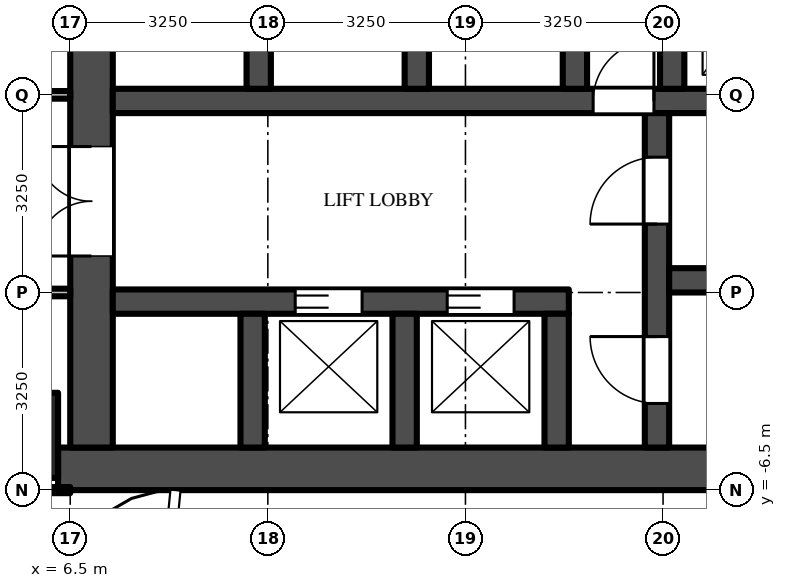
"""IFC4 building model, lengths in metres.
Left out: names, types, materials, properties, quantities, classifications, styles, units other than length and angle.
Written with IfcOpenShell. Run it as: python <this file> out.ifc"""

import sys

from ifc_helpers import new_model, si_unit, direction, frame, frame_2d, origin, origin_2d, place, context, subcontext, project, spatial, rectangle, extrude, source, transform, mapped, element, fill, save


model = new_model("IFC4")
c1 = context("Model", 3, precision=1e-05, world=origin(), true_north=direction((0.0, 1.0)))
c2 = subcontext(c1, "Body", "Model", "MODEL_VIEW")
j1 = project(units=[si_unit("LENGTHUNIT", "METRE"), si_unit("PLANEANGLEUNIT", "RADIAN")], contexts=[c1])
p1 = place(None, origin())
s1 = spatial("IfcSite", under=j1, at=p1, CompositionType="ELEMENT")
p2 = place(p1, origin())
s2 = spatial("IfcBuilding", under=s1, at=p2, CompositionType="ELEMENT")
p3 = place(p2, frame((0.0, 0.0, 65.5)))
s3 = spatial("IfcBuildingStorey", under=s2, at=p3, CompositionType="ELEMENT", Elevation=65.5)
m1 = source(origin(), c2, "Body", "SweptSolid", [
    extrude(rectangle(XDim=1.4, YDim=1.4, at=origin_2d()), origin(), (0.0, 0.0, 1.0), 4.5),
])
p4 = place(p3, frame((5.6, -5.6, 0.0), z_axis=(0.0, 0.0, 1.0), x_axis=(1.0, 0.0, 0.0)))
e1 = element("IfcColumn", 1, at=p4, inside=s3, PredefinedType="COLUMN", context=c2, shape_type="MappedRepresentation", body=[
    mapped(m1, transform((0.0, 0.0, 0.0))),
])
m2 = source(origin(), c2, "Body", "SweptSolid", [
    extrude(rectangle(XDim=16.45, YDim=0.7, at=frame_2d((8.225, 0.0))), origin(), (0.0, 0.0, 1.0), 4.25),
])
p5 = place(p3, frame((6.3, -6.15, 0.0), z_axis=(0.0, 0.0, 1.0), x_axis=(1.0, 0.0, 0.0)))
e2 = element("IfcWall", 2, at=p5, inside=s3, PredefinedType="SHEAR", context=c2, shape_type="MappedRepresentation", body=[
    mapped(m2, transform((0.0, 0.0, 0.0))),
])
m3 = source(origin(), c2, "Body", "SweptSolid", [
    extrude(rectangle(XDim=9.05, YDim=0.7, at=frame_2d((4.525, 0.0))), origin(), (0.0, 0.0, 1.0), 4.25),
])
p6 = place(p3, frame((6.85, -5.8, 0.0), z_axis=(0.0, 0.0, 1.0), x_axis=(0.0, 1.0, 0.0)))
e3 = element("IfcWall", 3, at=p6, inside=s3, PredefinedType="SHEAR", context=c2, shape_type="MappedRepresentation", body=[
    mapped(m3, transform((0.0, 0.0, 0.0))),
])
m4 = source(origin(), c2, "Body", "SweptSolid", [
    extrude(rectangle(XDim=1.8, YDim=2.1, at=frame_2d((0.9, 1.05))), frame((0.0, 0.36, 0.0), z_axis=(0.0, -1.0, 0.0), x_axis=(1.0, 0.0, 0.0)), (0.0, 0.0, 1.0), 0.72),
])
p7 = place(p6, frame((3.15, 0.0, 0.0)))
e4 = element("IfcOpeningElement", 4, at=p7, cuts=e3, PredefinedType="OPENING", context=c2, shape_type="MappedRepresentation", body=[
    mapped(m4, transform((0.0, 0.0, 0.0))),
])
m5 = source(origin(), c2, "Body", "SweptSolid", [
    extrude(rectangle(XDim=7.5, YDim=0.4, at=frame_2d((3.75, 0.0))), origin(), (0.0, 0.0, 1.0), 4.25),
])
p8 = place(p3, frame((7.2, -3.4, 0.0), z_axis=(0.0, 0.0, 1.0), x_axis=(1.0, 0.0, 0.0)))
e5 = element("IfcWall", 5, at=p8, inside=s3, PredefinedType="SHEAR", context=c2, shape_type="MappedRepresentation", body=[
    mapped(m5, transform((0.0, 0.0, 0.0))),
])
m6 = source(origin(), c2, "Body", "SweptSolid", [
    extrude(rectangle(XDim=1.1, YDim=2.1, at=frame_2d((0.55, 1.05))), frame((0.0, 0.21, 0.0), z_axis=(0.0, -1.0, 0.0), x_axis=(1.0, 0.0, 0.0)), (0.0, 0.0, 1.0), 0.42),
])
p9 = place(p8, frame((3.0, 0.0, 0.0)))
e6 = element("IfcOpeningElement", 6, at=p9, cuts=e5, PredefinedType="OPENING", context=c2, shape_type="MappedRepresentation", body=[
    mapped(m6, transform((0.0, 0.0, 0.0))),
])
p10 = place(p8, frame((5.5, 0.0, 0.0)))
e7 = element("IfcOpeningElement", 7, at=p10, cuts=e5, PredefinedType="OPENING", context=c2, shape_type="MappedRepresentation", body=[
    mapped(m6, transform((0.0, 0.0, 0.0))),
])
m7 = source(origin(), c2, "Body", "SweptSolid", [
    extrude(rectangle(XDim=14.85, YDim=0.4, at=frame_2d((7.425, 0.0))), origin(), (0.0, 0.0, 1.0), 4.25),
])
p11 = place(p3, frame((7.2, -0.1, 0.0), z_axis=(0.0, 0.0, 1.0), x_axis=(1.0, 0.0, 0.0)))
e8 = element("IfcWall", 8, at=p11, inside=s3, PredefinedType="SHEAR", context=c2, shape_type="MappedRepresentation", body=[
    mapped(m7, transform((0.0, 0.0, 0.0))),
])
m8 = source(origin(), c2, "Body", "SweptSolid", [
    extrude(rectangle(XDim=1.0, YDim=2.1, at=frame_2d((0.5, 1.05))), frame((0.0, 0.21, 0.0), z_axis=(0.0, -1.0, 0.0), x_axis=(1.0, 0.0, 0.0)), (0.0, 0.0, 1.0), 0.42),
])
p12 = place(p11, frame((7.9, 0.0, 0.0)))
e9 = element("IfcOpeningElement", 9, at=p12, cuts=e8, PredefinedType="OPENING", context=c2, shape_type="MappedRepresentation", body=[
    mapped(m8, transform((0.0, 0.0, 0.0))),
])
m9 = source(origin(), c2, "Body", "SweptSolid", [
    extrude(rectangle(XDim=5.5, YDim=0.4, at=frame_2d((2.75, 0.0))), origin(), (0.0, 0.0, 1.0), 4.25),
])
p13 = place(p3, frame((16.15, -5.8, 0.0), z_axis=(0.0, 0.0, 1.0), x_axis=(0.0, 1.0, 0.0)))
e10 = element("IfcWall", 10, at=p13, inside=s3, PredefinedType="SHEAR", context=c2, shape_type="MappedRepresentation", body=[
    mapped(m9, transform((0.0, 0.0, 0.0))),
])
p14 = place(p13, frame((0.725, 0.0, 0.0)))
e11 = element("IfcOpeningElement", 11, at=p14, cuts=e10, PredefinedType="OPENING", context=c2, shape_type="MappedRepresentation", body=[
    mapped(m6, transform((0.0, 0.0, 0.0))),
])
p15 = place(p13, frame((3.675, 0.0, 0.0)))
e12 = element("IfcOpeningElement", 12, at=p15, cuts=e10, PredefinedType="OPENING", context=c2, shape_type="MappedRepresentation", body=[
    mapped(m6, transform((0.0, 0.0, 0.0))),
])
m10 = source(origin(), c2, "Body", "SweptSolid", [
    extrude(rectangle(XDim=5.7, YDim=0.4, at=frame_2d((2.85, 0.0))), origin(), (0.0, 0.0, 1.0), 4.25),
])
p16 = place(p3, frame((16.35, -3.05, 0.0), z_axis=(0.0, 0.0, 1.0), x_axis=(1.0, 0.0, 0.0)))
e13 = element("IfcWall", 13, at=p16, inside=s3, PredefinedType="SHEAR", context=c2, shape_type="MappedRepresentation", body=[
    mapped(m10, transform((0.0, 0.0, 0.0))),
])
m11 = source(origin(), c2, "Body", "SweptSolid", [
    extrude(rectangle(XDim=2.2, YDim=0.4, at=frame_2d((1.1, 0.0))), origin(), (0.0, 0.0, 1.0), 4.25),
])
for number, where, z_axis, x_axis in (
    (14, (9.5, -5.8, 0.0), (0.0, 0.0, 1.0), (0.0, 1.0, 0.0)),
    (15, (12.0, -5.8, 0.0), (0.0, 0.0, 1.0), (0.0, 1.0, 0.0)),
    (16, (14.5, -5.8, 0.0), (0.0, 0.0, 1.0), (0.0, 1.0, 0.0)),
):
    element("IfcWall", number, at=place(p3, frame(where, z_axis=z_axis, x_axis=x_axis)), inside=s3, PredefinedType="SHEAR", context=c2, shape_type="MappedRepresentation", body=[
        mapped(m11, transform((0.0, 0.0, 0.0))),
    ])
m12 = source(origin(), c2, "Body", "SweptSolid", [
    extrude(rectangle(XDim=2.45, YDim=0.4, at=frame_2d((1.225, 0.0))), origin(), (0.0, 0.0, 1.0), 4.25),
])
for number, where, z_axis, x_axis in (
    (17, (9.6, 0.1, 0.0), (0.0, 0.0, 1.0), (0.0, 1.0, 0.0)),
    (18, (12.2, 0.1, 0.0), (0.0, 0.0, 1.0), (0.0, 1.0, 0.0)),
    (19, (14.8, 0.1, 0.0), (0.0, 0.0, 1.0), (0.0, 1.0, 0.0)),
    (20, (16.4, 0.1, 0.0), (0.0, 0.0, 1.0), (0.0, 1.0, 0.0)),
):
    element("IfcWall", number, at=place(p3, frame(where, z_axis=z_axis, x_axis=x_axis)), inside=s3, PredefinedType="SHEAR", context=c2, shape_type="MappedRepresentation", body=[
        mapped(m12, transform((0.0, 0.0, 0.0))),
    ])
m13 = source(origin(), c2, "Body", "SweptSolid", [
    extrude(rectangle(XDim=5.238, YDim=0.1, at=frame_2d((2.619, 0.0))), origin(), (0.0, 0.0, 1.0), 3.33),
])
p17 = place(p3, frame((1.262, -6.5, 0.0), z_axis=(0.0, 0.0, 1.0), x_axis=(1.0, 0.0, 0.0)))
e21 = element("IfcWall", 21, at=p17, inside=s3, PredefinedType="PARTITIONING", context=c2, shape_type="MappedRepresentation", body=[
    mapped(m13, transform((0.0, 0.0, 0.0))),
])
m14 = source(origin(), c2, "Body", "SweptSolid", [
    extrude(rectangle(XDim=5.363, YDim=0.125, at=frame_2d((2.681, 0.0))), origin(), (0.0, 0.0, 1.0), 3.468),
])
p18 = place(p3, frame((6.5, -3.25, 0.0), z_axis=(0.0, 0.0, 1.0), x_axis=(-1.0, 0.0, 0.0)))
e22 = element("IfcWall", 22, at=p18, inside=s3, PredefinedType="PARTITIONING", context=c2, shape_type="MappedRepresentation", body=[
    mapped(m14, transform((0.0, 0.0, 0.0))),
])
m15 = source(origin(), c2, "Body", "SweptSolid", [
    extrude(rectangle(XDim=1.1, YDim=2.1, at=frame_2d((0.55, 1.05))), frame((0.0, 0.073, 0.0), z_axis=(0.0, -1.0, 0.0), x_axis=(1.0, 0.0, 0.0)), (0.0, 0.0, 1.0), 0.145),
])
p19 = place(p18, frame((0.35, 0.0, 0.0)))
e23 = element("IfcOpeningElement", 23, at=p19, cuts=e22, PredefinedType="OPENING", context=c2, shape_type="MappedRepresentation", body=[
    mapped(m15, transform((0.0, 0.0, 0.0))),
])
p20 = place(p3, frame((6.5, 0.0, 0.0), z_axis=(0.0, 0.0, 1.0), x_axis=(-1.0, 0.0, 0.0)))
e24 = element("IfcWall", 24, at=p20, inside=s3, PredefinedType="PARTITIONING", context=c2, shape_type="MappedRepresentation", body=[
    mapped(m14, transform((0.0, 0.0, 0.0))),
])
m16 = source(origin(), c2, "Body", "SweptSolid", [
    extrude(rectangle(XDim=1.0, YDim=2.1, at=frame_2d((0.5, 1.05))), frame((0.0, 0.073, 0.0), z_axis=(0.0, -1.0, 0.0), x_axis=(1.0, 0.0, 0.0)), (0.0, 0.0, 1.0), 0.145),
])
p21 = place(p20, frame((3.95, 0.0, 0.0)))
e25 = element("IfcOpeningElement", 25, at=p21, cuts=e24, PredefinedType="OPENING", context=c2, shape_type="MappedRepresentation", body=[
    mapped(m16, transform((0.0, 0.0, 0.0))),
])
m17 = source(origin(), c2, "Body", "SweptSolid", [
    extrude(rectangle(XDim=1.1, YDim=2.1, at=frame_2d((0.55, 1.05))), frame((0.0, 0.025, 0.0), z_axis=(0.0, -1.0, 0.0), x_axis=(1.0, 0.0, 0.0)), (0.0, 0.0, 1.0), 0.05),
])
p22 = place(p9, origin())
e26 = element("IfcDoor", 26, at=p22, inside=s3, OperationType="DOUBLE_DOOR_SLIDING", PredefinedType="DOOR", context=c2, shape_type="MappedRepresentation", body=[
    mapped(m17, transform((0.0, 0.0, 0.0))),
])
fill(e6, e26)
p23 = place(p10, origin())
e27 = element("IfcDoor", 27, at=p23, inside=s3, OperationType="DOUBLE_DOOR_SLIDING", PredefinedType="DOOR", context=c2, shape_type="MappedRepresentation", body=[
    mapped(m17, transform((0.0, 0.0, 0.0))),
])
fill(e7, e27)
m18 = source(origin(), c2, "Body", "SweptSolid", [
    extrude(rectangle(XDim=1.8, YDim=2.1, at=frame_2d((0.9, 1.05))), frame((0.0, -0.275, 0.0), z_axis=(0.0, -1.0, 0.0), x_axis=(1.0, 0.0, 0.0)), (0.0, 0.0, 1.0), 0.05),
])
p24 = place(p7, origin())
e28 = element("IfcDoor", 28, at=p24, inside=s3, OperationType="DOUBLE_DOOR_SINGLE_SWING", PredefinedType="DOOR", context=c2, shape_type="MappedRepresentation", body=[
    mapped(m18, transform((0.0, 0.0, 0.0))),
])
fill(e4, e28)
p25 = place(p14, origin())
e29 = element("IfcDoor", 29, at=p25, inside=s3, OperationType="SINGLE_SWING_RIGHT", PredefinedType="DOOR", context=c2, shape_type="MappedRepresentation", body=[
    mapped(m17, transform((0.0, 0.0, 0.0))),
])
fill(e11, e29)
p26 = place(p15, origin())
e30 = element("IfcDoor", 30, at=p26, inside=s3, OperationType="SINGLE_SWING_LEFT", PredefinedType="DOOR", context=c2, shape_type="MappedRepresentation", body=[
    mapped(m17, transform((0.0, 0.0, 0.0))),
])
fill(e12, e30)
m19 = source(origin(), c2, "Body", "SweptSolid", [
    extrude(rectangle(XDim=1.0, YDim=2.1, at=frame_2d((0.5, 1.05))), frame((0.0, 0.025, 0.0), z_axis=(0.0, -1.0, 0.0), x_axis=(1.0, 0.0, 0.0)), (0.0, 0.0, 1.0), 0.05),
])
p27 = place(p12, origin())
e31 = element("IfcDoor", 31, at=p27, inside=s3, OperationType="SINGLE_SWING_RIGHT", PredefinedType="DOOR", context=c2, shape_type="MappedRepresentation", body=[
    mapped(m19, transform((0.0, 0.0, 0.0))),
])
fill(e9, e31)
save(model, sys.argv[1])
